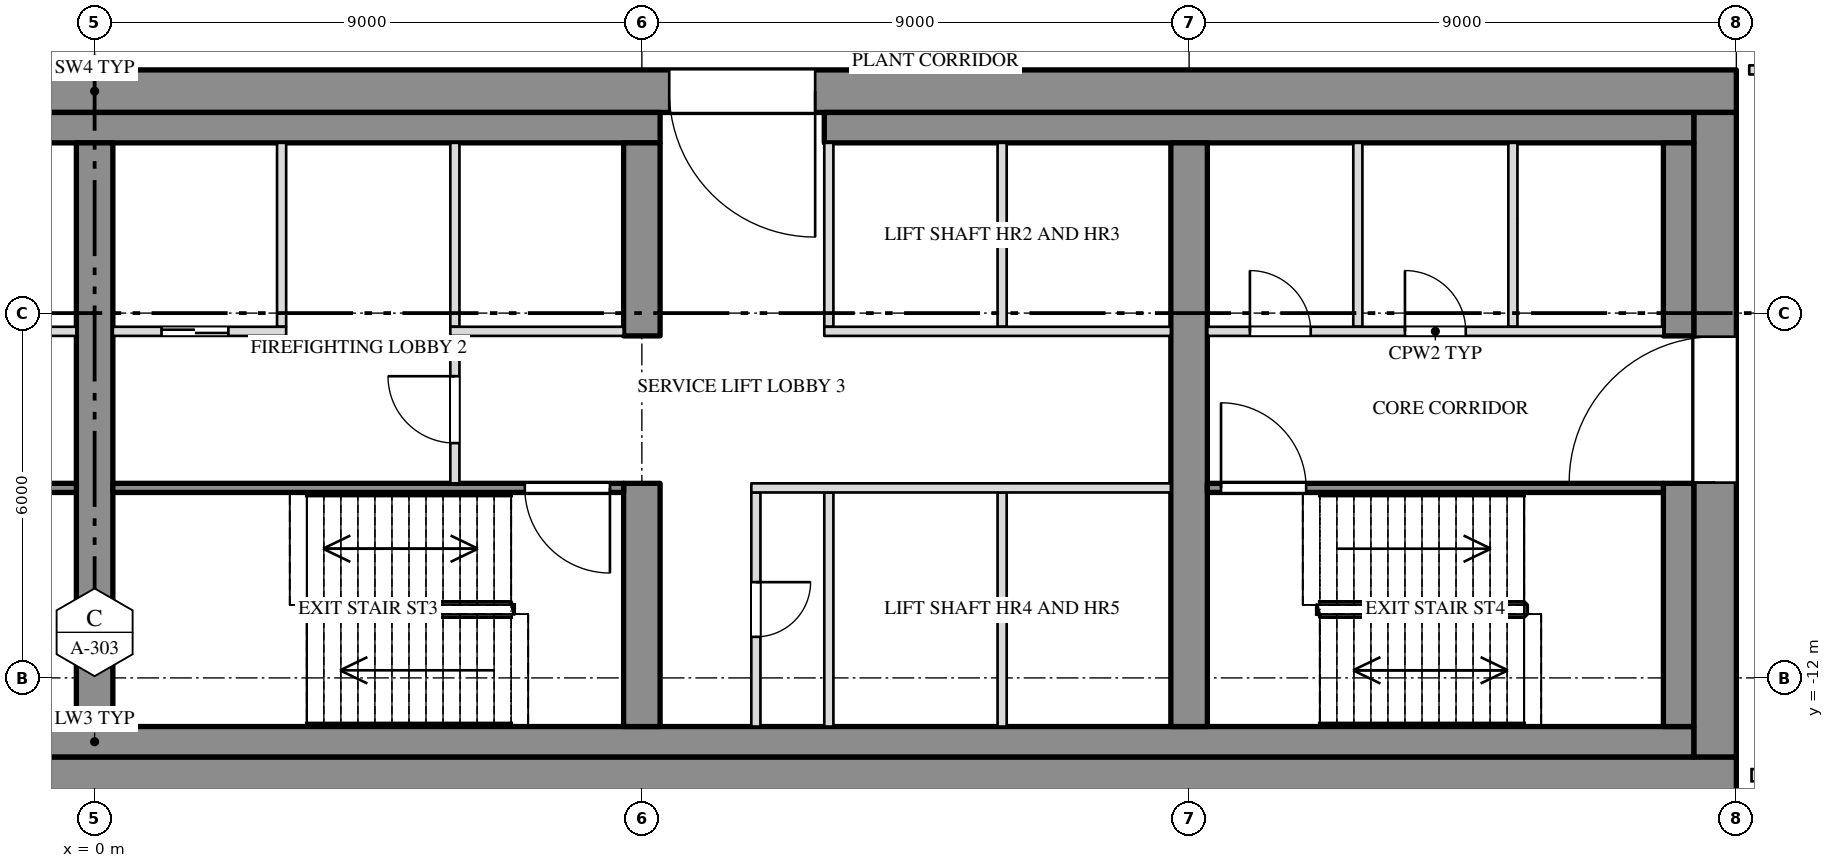
"""IFC4 building model, lengths in metres.
Left out: names, types, materials, properties, quantities, classifications, styles, units other than length and angle.
Written with IfcOpenShell. Run it as: python <this file> out.ifc"""

import sys

from ifc_helpers import new_model, si_unit, direction, frame, frame_2d, origin, place, context, subcontext, project, spatial, rectangle, extrude, element, fill, save


model = new_model("IFC4")
c1 = context("Model", 3, precision=1e-05, world=origin(), true_north=direction((0.0, 1.0)))
c2 = subcontext(c1, "Body", "Model", "MODEL_VIEW")
j1 = project(units=[si_unit("LENGTHUNIT", "METRE"), si_unit("PLANEANGLEUNIT", "RADIAN")], contexts=[c1])
p1 = place(None, origin())
s1 = spatial("IfcSite", under=j1, at=p1, CompositionType="ELEMENT")
p2 = place(p1, origin())
s2 = spatial("IfcBuilding", under=s1, at=p2, CompositionType="ELEMENT")
p3 = place(p2, frame((0.0, 0.0, 216.5)))
s3 = spatial("IfcBuildingStorey", under=s2, at=p3, CompositionType="ELEMENT", Elevation=216.5)
p4 = place(p3, frame((-27.0, -2.35, 0.0), z_axis=(0.0, 0.0, 1.0), x_axis=(1.0, 0.0, 0.0)))
e1 = element("IfcWall", 1, at=p4, inside=s3, PredefinedType="SHEAR", context=c2, shape_type="SweptSolid", body=[
    extrude(rectangle(XDim=54.0, YDim=0.7, at=frame_2d((27.0, 0.0))), origin(), (0.0, 0.0, 1.0), 3.8),
])
p5 = place(p4, frame((15.15, 0.0, 0.0)))
e2 = element("IfcOpeningElement", 2, at=p5, cuts=e1, PredefinedType="OPENING", context=c2, shape_type="SweptSolid", body=[
    extrude(rectangle(XDim=2.4, YDim=2.1, at=frame_2d((1.2, 1.05))), frame((0.0, 0.362, 0.0), z_axis=(0.0, -1.0, 0.0), x_axis=(1.0, 0.0, 0.0)), (0.0, 0.0, 1.0), 0.724),
])
p6 = place(p4, frame((36.45, 0.0, 0.0)))
e3 = element("IfcOpeningElement", 3, at=p6, cuts=e1, PredefinedType="OPENING", context=c2, shape_type="SweptSolid", body=[
    extrude(rectangle(XDim=2.4, YDim=2.1, at=frame_2d((1.2, 1.05))), frame((0.0, 0.362, 0.0), z_axis=(0.0, -1.0, 0.0), x_axis=(1.0, 0.0, 0.0)), (0.0, 0.0, 1.0), 0.724),
])
p7 = place(p3, frame((-27.0, -13.65, 0.0), z_axis=(0.0, 0.0, 1.0), x_axis=(1.0, 0.0, 0.0)))
e4 = element("IfcWall", 4, at=p7, inside=s3, PredefinedType="SHEAR", context=c2, shape_type="SweptSolid", body=[
    extrude(rectangle(XDim=54.0, YDim=0.7, at=frame_2d((27.0, 0.0))), origin(), (0.0, 0.0, 1.0), 3.8),
])
p8 = place(p3, frame((26.65, -13.3, 0.0), z_axis=(0.0, 0.0, 1.0), x_axis=(0.0, 1.0, 0.0)))
e5 = element("IfcWall", 5, at=p8, inside=s3, PredefinedType="SHEAR", context=c2, shape_type="SweptSolid", body=[
    extrude(rectangle(XDim=10.6, YDim=0.7, at=frame_2d((5.3, 0.0))), origin(), (0.0, 0.0, 1.0), 3.8),
])
p9 = place(p8, frame((4.512, 0.0, 0.0)))
e6 = element("IfcOpeningElement", 6, at=p9, cuts=e5, PredefinedType="OPENING", context=c2, shape_type="SweptSolid", body=[
    extrude(rectangle(XDim=2.4, YDim=2.1, at=frame_2d((1.2, 1.05))), frame((0.0, 0.362, 0.0), z_axis=(0.0, -1.0, 0.0), x_axis=(1.0, 0.0, 0.0)), (0.0, 0.0, 1.0), 0.724),
])
p10 = place(p3, frame((-9.3, -2.95, 0.0), z_axis=(0.0, 0.0, 1.0), x_axis=(1.0, 0.0, 0.0)))
e7 = element("IfcWall", 7, at=p10, inside=s3, PredefinedType="SHEAR", context=c2, shape_type="SweptSolid", body=[
    extrude(rectangle(XDim=18.6, YDim=0.5, at=frame_2d((9.3, 0.0))), origin(), (0.0, 0.0, 1.0), 3.8),
])
p11 = place(p3, frame((12.0, -2.95, 0.0), z_axis=(0.0, 0.0, 1.0), x_axis=(1.0, 0.0, 0.0)))
e8 = element("IfcWall", 8, at=p11, inside=s3, PredefinedType="SHEAR", context=c2, shape_type="SweptSolid", body=[
    extrude(rectangle(XDim=14.3, YDim=0.5, at=frame_2d((7.15, 0.0))), origin(), (0.0, 0.0, 1.0), 3.8),
])
p12 = place(p3, frame((-26.3, -13.05, 0.0), z_axis=(0.0, 0.0, 1.0), x_axis=(1.0, 0.0, 0.0)))
e9 = element("IfcWall", 9, at=p12, inside=s3, PredefinedType="SHEAR", context=c2, shape_type="SweptSolid", body=[
    extrude(rectangle(XDim=52.6, YDim=0.5, at=frame_2d((26.3, 0.0))), origin(), (0.0, 0.0, 1.0), 3.8),
])
p13 = place(p3, frame((26.05, -12.8, 0.0), z_axis=(0.0, 0.0, 1.0), x_axis=(0.0, 1.0, 0.0)))
e10 = element("IfcWall", 10, at=p13, inside=s3, PredefinedType="SHEAR", context=c2, shape_type="SweptSolid", body=[
    extrude(rectangle(XDim=4.0, YDim=0.5, at=frame_2d((2.0, 0.0))), origin(), (0.0, 0.0, 1.0), 3.8),
])
p14 = place(p3, frame((26.05, -6.375, 0.0), z_axis=(0.0, 0.0, 1.0), x_axis=(0.0, 1.0, 0.0)))
e11 = element("IfcWall", 11, at=p14, inside=s3, PredefinedType="SHEAR", context=c2, shape_type="SweptSolid", body=[
    extrude(rectangle(XDim=3.175, YDim=0.5, at=frame_2d((1.587, 0.0))), origin(), (0.0, 0.0, 1.0), 3.8),
])
p15 = place(p3, frame((0.0, -12.8, 0.0), z_axis=(0.0, 0.0, 1.0), x_axis=(0.0, 1.0, 0.0)))
e12 = element("IfcWall", 12, at=p15, inside=s3, PredefinedType="SHEAR", context=c2, shape_type="SweptSolid", body=[
    extrude(rectangle(XDim=9.6, YDim=0.6, at=frame_2d((4.8, 0.0))), origin(), (0.0, 0.0, 1.0), 3.8),
])
p16 = place(p3, frame((9.0, -12.8, 0.0), z_axis=(0.0, 0.0, 1.0), x_axis=(0.0, 1.0, 0.0)))
e13 = element("IfcWall", 13, at=p16, inside=s3, PredefinedType="SHEAR", context=c2, shape_type="SweptSolid", body=[
    extrude(rectangle(XDim=4.0, YDim=0.6, at=frame_2d((2.0, 0.0))), origin(), (0.0, 0.0, 1.0), 3.8),
])
p17 = place(p3, frame((9.0, -6.375, 0.0), z_axis=(0.0, 0.0, 1.0), x_axis=(0.0, 1.0, 0.0)))
e14 = element("IfcWall", 14, at=p17, inside=s3, PredefinedType="SHEAR", context=c2, shape_type="SweptSolid", body=[
    extrude(rectangle(XDim=3.175, YDim=0.6, at=frame_2d((1.587, 0.0))), origin(), (0.0, 0.0, 1.0), 3.8),
])
p18 = place(p3, frame((18.0, -12.8, 0.0), z_axis=(0.0, 0.0, 1.0), x_axis=(0.0, 1.0, 0.0)))
e15 = element("IfcWall", 15, at=p18, inside=s3, PredefinedType="SHEAR", context=c2, shape_type="SweptSolid", body=[
    extrude(rectangle(XDim=9.6, YDim=0.6, at=frame_2d((4.8, 0.0))), origin(), (0.0, 0.0, 1.0), 3.8),
])
p19 = place(p3, frame((27.212, -2.0, 0.0), z_axis=(0.0, 0.0, 1.0), x_axis=(1.0, 0.0, 0.0)))
e16 = element("IfcWall", 16, at=p19, inside=s3, PredefinedType="PARTITIONING", context=c2, shape_type="SweptSolid", body=[
    extrude(rectangle(XDim=3.763, YDim=0.15, at=frame_2d((1.882, 0.0))), origin(), (0.0, 0.0, 1.0), 3.8),
])
p20 = place(p19, frame((1.366, 0.0, 0.0)))
e17 = element("IfcOpeningElement", 17, at=p20, cuts=e16, PredefinedType="OPENING", context=c2, shape_type="SweptSolid", body=[
    extrude(rectangle(XDim=1.0, YDim=2.1, at=frame_2d((0.5, 1.05))), frame((0.0, 0.087, 0.0), z_axis=(0.0, -1.0, 0.0), x_axis=(1.0, 0.0, 0.0)), (0.0, 0.0, 1.0), 0.174),
])
for number, where, z_axis, x_axis in (
    (18, (3.075, -6.225, 0.0), (0.0, 0.0, 1.0), (0.0, 1.0, 0.0)),
    (19, (5.925, -6.225, 0.0), (0.0, 0.0, 1.0), (0.0, 1.0, 0.0)),
    (20, (12.075, -6.225, 0.0), (0.0, 0.0, 1.0), (0.0, 1.0, 0.0)),
    (21, (14.925, -6.225, 0.0), (0.0, 0.0, 1.0), (0.0, 1.0, 0.0)),
    (22, (20.775, -6.225, 0.0), (0.0, 0.0, 1.0), (0.0, 1.0, 0.0)),
    (23, (23.325, -6.225, 0.0), (0.0, 0.0, 1.0), (0.0, 1.0, 0.0)),
):
    element("IfcWall", number, at=place(p3, frame(where, z_axis=z_axis, x_axis=x_axis)), inside=s3, PredefinedType="PARTITIONING", context=c2, shape_type="SweptSolid", body=[
        extrude(rectangle(XDim=3.025, YDim=0.15, at=frame_2d((1.513, 0.0))), origin(), (0.0, 0.0, 1.0), 3.8),
    ])
p21 = place(p3, frame((10.875, -12.8, 0.0), z_axis=(0.0, 0.0, 1.0), x_axis=(0.0, 1.0, 0.0)))
e24 = element("IfcWall", 24, at=p21, inside=s3, PredefinedType="PARTITIONING", context=c2, shape_type="SweptSolid", body=[
    extrude(rectangle(XDim=3.85, YDim=0.15, at=frame_2d((1.925, 0.0))), origin(), (0.0, 0.0, 1.0), 3.8),
])
p22 = place(p21, frame((1.475, 0.0, 0.0)))
e25 = element("IfcOpeningElement", 25, at=p22, cuts=e24, PredefinedType="OPENING", context=c2, shape_type="SweptSolid", body=[
    extrude(rectangle(XDim=0.9, YDim=2.1, at=frame_2d((0.45, 1.05))), frame((0.0, 0.087, 0.0), z_axis=(0.0, -1.0, 0.0), x_axis=(1.0, 0.0, 0.0)), (0.0, 0.0, 1.0), 0.174),
])
for number, where, z_axis, x_axis in (
    (26, (12.075, -12.8, 0.0), (0.0, 0.0, 1.0), (0.0, 1.0, 0.0)),
    (27, (14.925, -12.8, 0.0), (0.0, 0.0, 1.0), (0.0, 1.0, 0.0)),
):
    element("IfcWall", number, at=place(p3, frame(where, z_axis=z_axis, x_axis=x_axis)), inside=s3, PredefinedType="PARTITIONING", context=c2, shape_type="SweptSolid", body=[
        extrude(rectangle(XDim=3.85, YDim=0.15, at=frame_2d((1.925, 0.0))), origin(), (0.0, 0.0, 1.0), 3.8),
    ])
p23 = place(p3, frame((5.925, -8.8, 0.0), z_axis=(0.0, 0.0, 1.0), x_axis=(0.0, 1.0, 0.0)))
e28 = element("IfcWall", 28, at=p23, inside=s3, PredefinedType="PARTITIONING", context=c2, shape_type="SweptSolid", body=[
    extrude(rectangle(XDim=2.425, YDim=0.15, at=frame_2d((1.212, 0.0))), origin(), (0.0, 0.0, 1.0), 3.8),
])
p24 = place(p23, frame((0.662, 0.0, 0.0)))
e29 = element("IfcOpeningElement", 29, at=p24, cuts=e28, PredefinedType="OPENING", context=c2, shape_type="SweptSolid", body=[
    extrude(rectangle(XDim=1.1, YDim=2.1, at=frame_2d((0.55, 1.05))), frame((0.0, 0.087, 0.0), z_axis=(0.0, -1.0, 0.0), x_axis=(1.0, 0.0, 0.0)), (0.0, 0.0, 1.0), 0.174),
])
p25 = place(p3, frame((-3.15, -6.3, 0.0), z_axis=(0.0, 0.0, 1.0), x_axis=(1.0, 0.0, 0.0)))
e30 = element("IfcWall", 30, at=p25, inside=s3, PredefinedType="PARTITIONING", context=c2, shape_type="SweptSolid", body=[
    extrude(rectangle(XDim=2.85, YDim=0.15, at=frame_2d((1.425, 0.0))), origin(), (0.0, 0.0, 1.0), 3.8),
])
p26 = place(p25, frame((0.95, 0.0, 0.0)))
e31 = element("IfcOpeningElement", 31, at=p26, cuts=e30, PredefinedType="OPENING", context=c2, shape_type="SweptSolid", body=[
    extrude(rectangle(XDim=1.1, YDim=2.1, at=frame_2d((0.55, 1.05))), frame((0.0, 0.087, 0.0), z_axis=(0.0, -1.0, 0.0), x_axis=(1.0, 0.0, 0.0)), (0.0, 0.0, 1.0), 0.174),
])
p27 = place(p3, frame((0.3, -6.3, 0.0), z_axis=(0.0, 0.0, 1.0), x_axis=(1.0, 0.0, 0.0)))
e32 = element("IfcWall", 32, at=p27, inside=s3, PredefinedType="PARTITIONING", context=c2, shape_type="SweptSolid", body=[
    extrude(rectangle(XDim=2.85, YDim=0.15, at=frame_2d((1.425, 0.0))), origin(), (0.0, 0.0, 1.0), 3.8),
])
p28 = place(p27, frame((0.8, 0.0, 0.0)))
e33 = element("IfcOpeningElement", 33, at=p28, cuts=e32, PredefinedType="OPENING", context=c2, shape_type="SweptSolid", body=[
    extrude(rectangle(XDim=1.1, YDim=2.1, at=frame_2d((0.55, 1.05))), frame((0.0, 0.087, 0.0), z_axis=(0.0, -1.0, 0.0), x_axis=(1.0, 0.0, 0.0)), (0.0, 0.0, 1.0), 0.174),
])
p29 = place(p3, frame((5.85, -6.3, 0.0), z_axis=(0.0, 0.0, 1.0), x_axis=(1.0, 0.0, 0.0)))
e34 = element("IfcWall", 34, at=p29, inside=s3, PredefinedType="PARTITIONING", context=c2, shape_type="SweptSolid", body=[
    extrude(rectangle(XDim=2.85, YDim=0.15, at=frame_2d((1.425, 0.0))), origin(), (0.0, 0.0, 1.0), 3.8),
])
p30 = place(p3, frame((12.0, -6.3, 0.0), z_axis=(0.0, 0.0, 1.0), x_axis=(1.0, 0.0, 0.0)))
e35 = element("IfcWall", 35, at=p30, inside=s3, PredefinedType="PARTITIONING", context=c2, shape_type="SweptSolid", body=[
    extrude(rectangle(XDim=5.7, YDim=0.15, at=frame_2d((2.85, 0.0))), origin(), (0.0, 0.0, 1.0), 3.8),
])
p31 = place(p3, frame((18.3, -6.3, 0.0), z_axis=(0.0, 0.0, 1.0), x_axis=(1.0, 0.0, 0.0)))
e36 = element("IfcWall", 36, at=p31, inside=s3, PredefinedType="PARTITIONING", context=c2, shape_type="SweptSolid", body=[
    extrude(rectangle(XDim=7.5, YDim=0.15, at=frame_2d((3.75, 0.0))), origin(), (0.0, 0.0, 1.0), 3.8),
])
p32 = place(p31, frame((0.7, 0.0, 0.0)))
e37 = element("IfcOpeningElement", 37, at=p32, cuts=e36, PredefinedType="OPENING", context=c2, shape_type="SweptSolid", body=[
    extrude(rectangle(XDim=1.0, YDim=2.1, at=frame_2d((0.5, 1.05))), frame((0.0, 0.087, 0.0), z_axis=(0.0, -1.0, 0.0), x_axis=(1.0, 0.0, 0.0)), (0.0, 0.0, 1.0), 0.174),
])
p33 = place(p31, frame((3.25, 0.0, 0.0)))
e38 = element("IfcOpeningElement", 38, at=p33, cuts=e36, PredefinedType="OPENING", context=c2, shape_type="SweptSolid", body=[
    extrude(rectangle(XDim=1.0, YDim=2.1, at=frame_2d((0.5, 1.05))), frame((0.0, 0.087, 0.0), z_axis=(0.0, -1.0, 0.0), x_axis=(1.0, 0.0, 0.0)), (0.0, 0.0, 1.0), 0.174),
])
p34 = place(p3, frame((-8.7, -8.875, 0.0), z_axis=(0.0, 0.0, 1.0), x_axis=(1.0, 0.0, 0.0)))
e39 = element("IfcWall", 39, at=p34, inside=s3, PredefinedType="SHEAR", context=c2, shape_type="SweptSolid", body=[
    extrude(rectangle(XDim=8.4, YDim=0.15, at=frame_2d((4.2, 0.0))), origin(), (0.0, 0.0, 1.0), 3.8),
])
p35 = place(p34, frame((0.225, 0.0, 0.0)))
e40 = element("IfcOpeningElement", 40, at=p35, cuts=e39, PredefinedType="OPENING", context=c2, shape_type="SweptSolid", body=[
    extrude(rectangle(XDim=1.4, YDim=2.1, at=frame_2d((0.7, 1.05))), frame((0.0, 0.087, 0.0), z_axis=(0.0, -1.0, 0.0), x_axis=(1.0, 0.0, 0.0)), (0.0, 0.0, 1.0), 0.174),
])
p36 = place(p3, frame((0.3, -8.875, 0.0), z_axis=(0.0, 0.0, 1.0), x_axis=(1.0, 0.0, 0.0)))
e41 = element("IfcWall", 41, at=p36, inside=s3, PredefinedType="SHEAR", context=c2, shape_type="SweptSolid", body=[
    extrude(rectangle(XDim=8.4, YDim=0.15, at=frame_2d((4.2, 0.0))), origin(), (0.0, 0.0, 1.0), 3.8),
])
p37 = place(p36, frame((6.775, 0.0, 0.0)))
e42 = element("IfcOpeningElement", 42, at=p37, cuts=e41, PredefinedType="OPENING", context=c2, shape_type="SweptSolid", body=[
    extrude(rectangle(XDim=1.4, YDim=2.1, at=frame_2d((0.7, 1.05))), frame((0.0, 0.087, 0.0), z_axis=(0.0, -1.0, 0.0), x_axis=(1.0, 0.0, 0.0)), (0.0, 0.0, 1.0), 0.174),
])
p38 = place(p3, frame((10.8, -8.875, 0.0), z_axis=(0.0, 0.0, 1.0), x_axis=(1.0, 0.0, 0.0)))
e43 = element("IfcWall", 43, at=p38, inside=s3, PredefinedType="PARTITIONING", context=c2, shape_type="SweptSolid", body=[
    extrude(rectangle(XDim=6.9, YDim=0.15, at=frame_2d((3.45, 0.0))), origin(), (0.0, 0.0, 1.0), 3.8),
])
p39 = place(p3, frame((18.3, -8.875, 0.0), z_axis=(0.0, 0.0, 1.0), x_axis=(1.0, 0.0, 0.0)))
e44 = element("IfcWall", 44, at=p39, inside=s3, PredefinedType="SHEAR", context=c2, shape_type="SweptSolid", body=[
    extrude(rectangle(XDim=7.5, YDim=0.15, at=frame_2d((3.75, 0.0))), origin(), (0.0, 0.0, 1.0), 3.8),
])
p40 = place(p39, frame((0.225, 0.0, 0.0)))
e45 = element("IfcOpeningElement", 45, at=p40, cuts=e44, PredefinedType="OPENING", context=c2, shape_type="SweptSolid", body=[
    extrude(rectangle(XDim=1.4, YDim=2.1, at=frame_2d((0.7, 1.05))), frame((0.0, 0.087, 0.0), z_axis=(0.0, -1.0, 0.0), x_axis=(1.0, 0.0, 0.0)), (0.0, 0.0, 1.0), 0.174),
])
p41 = place(p28, origin())
e46 = element("IfcDoor", 46, at=p41, inside=s3, OperationType="SLIDING_TO_RIGHT", PredefinedType="DOOR", context=c2, shape_type="SweptSolid", body=[
    extrude(rectangle(XDim=1.1, YDim=2.1, at=frame_2d((0.55, 1.05))), frame((0.0, 0.025, 0.0), z_axis=(0.0, -1.0, 0.0), x_axis=(1.0, 0.0, 0.0)), (0.0, 0.0, 1.0), 0.05),
])
fill(e33, e46)
p42 = place(p24, origin())
e47 = element("IfcDoor", 47, at=p42, inside=s3, OperationType="SINGLE_SWING_RIGHT", PredefinedType="DOOR", context=c2, shape_type="SweptSolid", body=[
    extrude(rectangle(XDim=1.1, YDim=2.1, at=frame_2d((0.55, 1.05))), frame((0.0, 0.025, 0.0), z_axis=(0.0, -1.0, 0.0), x_axis=(1.0, 0.0, 0.0)), (0.0, 0.0, 1.0), 0.05),
])
fill(e29, e47)
p43 = place(p37, origin())
e48 = element("IfcDoor", 48, at=p43, inside=s3, OperationType="DOUBLE_DOOR_SINGLE_SWING", PredefinedType="DOOR", context=c2, shape_type="SweptSolid", body=[
    extrude(rectangle(XDim=1.4, YDim=2.1, at=frame_2d((0.7, 1.05))), frame((0.0, 0.025, 0.0), z_axis=(0.0, -1.0, 0.0), x_axis=(1.0, 0.0, 0.0)), (0.0, 0.0, 1.0), 0.05),
])
fill(e42, e48)
p44 = place(p6, origin())
e49 = element("IfcDoor", 49, at=p44, inside=s3, OperationType="DOUBLE_DOOR_SINGLE_SWING", PredefinedType="DOOR", context=c2, shape_type="SweptSolid", body=[
    extrude(rectangle(XDim=2.4, YDim=2.1, at=frame_2d((1.2, 1.05))), frame((0.0, 0.025, 0.0), z_axis=(0.0, -1.0, 0.0), x_axis=(1.0, 0.0, 0.0)), (0.0, 0.0, 1.0), 0.05),
])
fill(e3, e49)
p45 = place(p22, origin())
e50 = element("IfcDoor", 50, at=p45, inside=s3, OperationType="SINGLE_SWING_LEFT", PredefinedType="DOOR", context=c2, shape_type="SweptSolid", body=[
    extrude(rectangle(XDim=0.9, YDim=2.1, at=frame_2d((0.45, 1.05))), frame((0.0, 0.025, 0.0), z_axis=(0.0, -1.0, 0.0), x_axis=(1.0, 0.0, 0.0)), (0.0, 0.0, 1.0), 0.05),
])
fill(e25, e50)
p46 = place(p40, origin())
e51 = element("IfcDoor", 51, at=p46, inside=s3, OperationType="DOUBLE_DOOR_SINGLE_SWING", PredefinedType="DOOR", context=c2, shape_type="SweptSolid", body=[
    extrude(rectangle(XDim=1.4, YDim=2.1, at=frame_2d((0.7, 1.05))), frame((0.0, 0.025, 0.0), z_axis=(0.0, -1.0, 0.0), x_axis=(1.0, 0.0, 0.0)), (0.0, 0.0, 1.0), 0.05),
])
fill(e45, e51)
p47 = place(p32, origin())
e52 = element("IfcDoor", 52, at=p47, inside=s3, OperationType="SINGLE_SWING_LEFT", PredefinedType="DOOR", context=c2, shape_type="SweptSolid", body=[
    extrude(rectangle(XDim=1.0, YDim=2.1, at=frame_2d((0.5, 1.05))), frame((0.0, 0.025, 0.0), z_axis=(0.0, -1.0, 0.0), x_axis=(1.0, 0.0, 0.0)), (0.0, 0.0, 1.0), 0.05),
])
fill(e37, e52)
p48 = place(p33, origin())
e53 = element("IfcDoor", 53, at=p48, inside=s3, OperationType="SINGLE_SWING_LEFT", PredefinedType="DOOR", context=c2, shape_type="SweptSolid", body=[
    extrude(rectangle(XDim=1.0, YDim=2.1, at=frame_2d((0.5, 1.05))), frame((0.0, 0.025, 0.0), z_axis=(0.0, -1.0, 0.0), x_axis=(1.0, 0.0, 0.0)), (0.0, 0.0, 1.0), 0.05),
])
fill(e38, e53)
p49 = place(p9, origin())
e54 = element("IfcDoor", 54, at=p49, inside=s3, OperationType="DOUBLE_DOOR_SINGLE_SWING", PredefinedType="DOOR", context=c2, shape_type="SweptSolid", body=[
    extrude(rectangle(XDim=2.4, YDim=2.1, at=frame_2d((1.2, 1.05))), frame((0.0, 0.025, 0.0), z_axis=(0.0, -1.0, 0.0), x_axis=(1.0, 0.0, 0.0)), (0.0, 0.0, 1.0), 0.05),
])
fill(e6, e54)
save(model, sys.argv[1])
